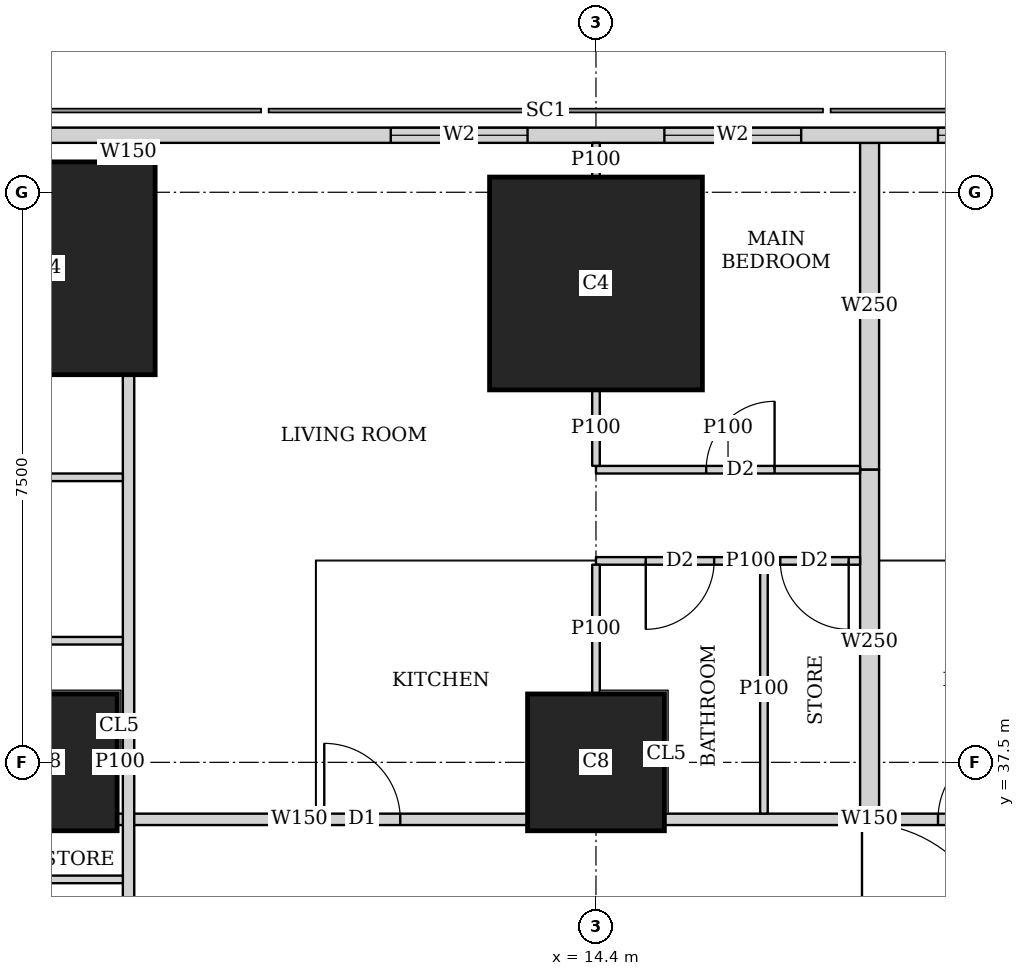
"""IFC4 building model, lengths in metres.
Left out: names, types, materials, properties, quantities, classifications, styles, units other than length and angle.
Written with IfcOpenShell. Run it as: python <this file> out.ifc"""

import sys

from ifc_helpers import new_model, si_unit, direction, frame, frame_2d, origin, origin_2d, place, context, subcontext, project, spatial, rectangle, extrude, element, fill, save


model = new_model("IFC4")
c1 = context("Model", 3, precision=1e-05, world=origin(), true_north=direction((0.0, 1.0)))
c2 = subcontext(c1, "Body", "Model", "MODEL_VIEW")
j1 = project(units=[si_unit("LENGTHUNIT", "METRE"), si_unit("PLANEANGLEUNIT", "RADIAN")], contexts=[c1])
p1 = place(None, origin())
s1 = spatial("IfcSite", under=j1, at=p1, CompositionType="ELEMENT")
p2 = place(p1, origin())
s2 = spatial("IfcBuilding", under=s1, at=p2, CompositionType="ELEMENT")
p3 = place(p2, frame((0.0, 0.0, 53.75)))
s3 = spatial("IfcBuildingStorey", under=s2, at=p3, CompositionType="ELEMENT", Elevation=53.75)
for number, where, z_axis, x_axis in (
    (1, (7.2, 37.5, 0.0), (0.0, 0.0, 1.0), (1.0, 0.0, 0.0)),
    (2, (14.4, 37.5, 0.0), (0.0, 0.0, 1.0), (1.0, 0.0, 0.0)),
):
    element("IfcColumn", number, at=place(p3, frame(where, z_axis=z_axis, x_axis=x_axis)), inside=s3, PredefinedType="COLUMN", context=c2, shape_type="SweptSolid", body=[
        extrude(rectangle(XDim=1.8, YDim=1.8, at=origin_2d()), origin(), (0.0, 0.0, 1.0), 3.75),
    ])
for number, where, z_axis, x_axis in (
    (3, (7.2, 44.0, 0.0), (0.0, 0.0, 1.0), (1.0, 0.0, 0.0)),
    (4, (14.4, 43.8, 0.0), (0.0, 0.0, 1.0), (1.0, 0.0, 0.0)),
):
    element("IfcColumn", number, at=place(p3, frame(where, z_axis=z_axis, x_axis=x_axis)), inside=s3, PredefinedType="COLUMN", context=c2, shape_type="SweptSolid", body=[
        extrude(rectangle(XDim=2.8, YDim=2.8, at=origin_2d()), origin(), (0.0, 0.0, 1.0), 3.75),
    ])
p4 = place(p3, frame((40.106, 45.75, 0.0), z_axis=(0.0, 0.0, 1.0), x_axis=(-1.0, 0.0, 0.0)))
e5 = element("IfcWall", 5, at=p4, inside=s3, PredefinedType="SOLIDWALL", context=c2, shape_type="SweptSolid", body=[
    extrude(rectangle(XDim=37.943, YDim=0.2, at=frame_2d((18.971, 0.0))), origin(), (0.0, 0.0, 1.0), 3.5),
])
p5 = place(p4, frame((8.606, 0.0, 0.9)))
e6 = element("IfcOpeningElement", 6, at=p5, cuts=e5, PredefinedType="OPENING", context=c2, shape_type="SweptSolid", body=[
    extrude(rectangle(XDim=1.8, YDim=1.5, at=frame_2d((0.9, 0.75))), frame((0.0, 0.11, 0.0), z_axis=(0.0, -1.0, 0.0), x_axis=(1.0, 0.0, 0.0)), (0.0, 0.0, 1.0), 0.22),
])
p6 = place(p4, frame((12.206, 0.0, 0.9)))
e7 = element("IfcOpeningElement", 7, at=p6, cuts=e5, PredefinedType="OPENING", context=c2, shape_type="SweptSolid", body=[
    extrude(rectangle(XDim=1.8, YDim=1.5, at=frame_2d((0.9, 0.75))), frame((0.0, 0.11, 0.0), z_axis=(0.0, -1.0, 0.0), x_axis=(1.0, 0.0, 0.0)), (0.0, 0.0, 1.0), 0.22),
])
p7 = place(p4, frame((15.806, 0.0, 0.9)))
e8 = element("IfcOpeningElement", 8, at=p7, cuts=e5, PredefinedType="OPENING", context=c2, shape_type="SweptSolid", body=[
    extrude(rectangle(XDim=1.8, YDim=1.5, at=frame_2d((0.9, 0.75))), frame((0.0, 0.11, 0.0), z_axis=(0.0, -1.0, 0.0), x_axis=(1.0, 0.0, 0.0)), (0.0, 0.0, 1.0), 0.22),
])
p8 = place(p4, frame((19.406, 0.0, 0.9)))
e9 = element("IfcOpeningElement", 9, at=p8, cuts=e5, PredefinedType="OPENING", context=c2, shape_type="SweptSolid", body=[
    extrude(rectangle(XDim=1.8, YDim=1.5, at=frame_2d((0.9, 0.75))), frame((0.0, 0.11, 0.0), z_axis=(0.0, -1.0, 0.0), x_axis=(1.0, 0.0, 0.0)), (0.0, 0.0, 1.0), 0.22),
])
p9 = place(p4, frame((23.006, 0.0, 0.9)))
e10 = element("IfcOpeningElement", 10, at=p9, cuts=e5, PredefinedType="OPENING", context=c2, shape_type="SweptSolid", body=[
    extrude(rectangle(XDim=1.8, YDim=1.5, at=frame_2d((0.9, 0.75))), frame((0.0, 0.11, 0.0), z_axis=(0.0, -1.0, 0.0), x_axis=(1.0, 0.0, 0.0)), (0.0, 0.0, 1.0), 0.22),
])
p10 = place(p4, frame((26.606, 0.0, 0.9)))
e11 = element("IfcOpeningElement", 11, at=p10, cuts=e5, PredefinedType="OPENING", context=c2, shape_type="SweptSolid", body=[
    extrude(rectangle(XDim=1.8, YDim=1.5, at=frame_2d((0.9, 0.75))), frame((0.0, 0.11, 0.0), z_axis=(0.0, -1.0, 0.0), x_axis=(1.0, 0.0, 0.0)), (0.0, 0.0, 1.0), 0.22),
])
p11 = place(p3, frame((8.25, 2.426, 0.0), z_axis=(0.0, 0.0, 1.0), x_axis=(0.0, 1.0, 0.0)))
e12 = element("IfcWall", 12, at=p11, inside=s3, PredefinedType="SOLIDWALL", context=c2, shape_type="SweptSolid", body=[
    extrude(rectangle(XDim=40.173, YDim=0.15, at=frame_2d((20.086, 0.0))), origin(), (0.0, 0.0, 1.0), 3.5),
])
p12 = place(p11, frame((6.661, 0.0, 0.0)))
e13 = element("IfcOpeningElement", 13, at=p12, cuts=e12, PredefinedType="OPENING", context=c2, shape_type="SweptSolid", body=[
    extrude(rectangle(XDim=1.0, YDim=2.1, at=frame_2d((0.5, 1.05))), frame((0.0, 0.085, 0.0), z_axis=(0.0, -1.0, 0.0), x_axis=(1.0, 0.0, 0.0)), (0.0, 0.0, 1.0), 0.17),
])
p13 = place(p11, frame((9.986, 0.0, 0.0)))
e14 = element("IfcOpeningElement", 14, at=p13, cuts=e12, PredefinedType="OPENING", context=c2, shape_type="SweptSolid", body=[
    extrude(rectangle(XDim=1.0, YDim=2.1, at=frame_2d((0.5, 1.05))), frame((0.0, 0.085, 0.0), z_axis=(0.0, -1.0, 0.0), x_axis=(1.0, 0.0, 0.0)), (0.0, 0.0, 1.0), 0.17),
])
p14 = place(p11, frame((21.662, 0.0, 0.0)))
e15 = element("IfcOpeningElement", 15, at=p14, cuts=e12, PredefinedType="OPENING", context=c2, shape_type="SweptSolid", body=[
    extrude(rectangle(XDim=1.0, YDim=2.1, at=frame_2d((0.5, 1.05))), frame((0.0, 0.085, 0.0), z_axis=(0.0, -1.0, 0.0), x_axis=(1.0, 0.0, 0.0)), (0.0, 0.0, 1.0), 0.17),
])
p15 = place(p11, frame((29.161, 0.0, 0.0)))
e16 = element("IfcOpeningElement", 16, at=p15, cuts=e12, PredefinedType="OPENING", context=c2, shape_type="SweptSolid", body=[
    extrude(rectangle(XDim=1.0, YDim=2.1, at=frame_2d((0.5, 1.05))), frame((0.0, 0.085, 0.0), z_axis=(0.0, -1.0, 0.0), x_axis=(1.0, 0.0, 0.0)), (0.0, 0.0, 1.0), 0.17),
])
p16 = place(p3, frame((8.25, 45.401, 0.0), z_axis=(0.0, 0.0, 1.0), x_axis=(0.0, 1.0, 0.0)))
e17 = element("IfcWall", 17, at=p16, inside=s3, PredefinedType="SOLIDWALL", context=c2, shape_type="SweptSolid", body=[
    extrude(rectangle(XDim=0.249, YDim=0.15, at=frame_2d((0.125, 0.0))), origin(), (0.0, 0.0, 1.0), 3.5),
])
p17 = place(p3, frame((8.1, 36.75, 0.0), z_axis=(0.0, 0.0, 1.0), x_axis=(1.0, 0.0, 0.0)))
e18 = element("IfcWall", 18, at=p17, inside=s3, PredefinedType="SOLIDWALL", context=c2, shape_type="SweptSolid", body=[
    extrude(rectangle(XDim=5.399, YDim=0.15, at=frame_2d((2.699, 0.0))), origin(), (0.0, 0.0, 1.0), 3.5),
])
p18 = place(p17, frame((2.725, 0.0, 0.0)))
e19 = element("IfcOpeningElement", 19, at=p18, cuts=e18, PredefinedType="OPENING", context=c2, shape_type="SweptSolid", body=[
    extrude(rectangle(XDim=1.0, YDim=2.1, at=frame_2d((0.5, 1.05))), frame((0.0, 0.085, 0.0), z_axis=(0.0, -1.0, 0.0), x_axis=(1.0, 0.0, 0.0)), (0.0, 0.0, 1.0), 0.17),
])
p19 = place(p3, frame((15.301, 36.75, 0.0), z_axis=(0.0, 0.0, 1.0), x_axis=(1.0, 0.0, 0.0)))
e20 = element("IfcWall", 20, at=p19, inside=s3, PredefinedType="SOLIDWALL", context=c2, shape_type="SweptSolid", body=[
    extrude(rectangle(XDim=5.398, YDim=0.15, at=frame_2d((2.699, 0.0))), origin(), (0.0, 0.0, 1.0), 3.5),
])
p20 = place(p19, frame((3.599, 0.0, 0.0)))
e21 = element("IfcOpeningElement", 21, at=p20, cuts=e20, PredefinedType="OPENING", context=c2, shape_type="SweptSolid", body=[
    extrude(rectangle(XDim=1.0, YDim=2.1, at=frame_2d((0.5, 1.05))), frame((0.0, 0.085, 0.0), z_axis=(0.0, -1.0, 0.0), x_axis=(1.0, 0.0, 0.0)), (0.0, 0.0, 1.0), 0.17),
])
p21 = place(p3, frame((8.101, 37.5, 0.0), z_axis=(0.0, 0.0, 1.0), x_axis=(1.0, 0.0, 0.0)))
e22 = element("IfcWall", 22, at=p21, inside=s3, PredefinedType="PARTITIONING", context=c2, shape_type="SweptSolid", body=[
    extrude(rectangle(XDim=0.074, YDim=0.1, at=frame_2d((0.037, 0.0))), origin(), (0.0, 0.0, 1.0), 3.5),
])
for number, where, z_axis, x_axis in (
    (23, (4.9, 41.25, 0.0), (0.0, 0.0, 1.0), (1.0, 0.0, 0.0)),
    (24, (4.9, 35.96, 0.0), (0.0, 0.0, 1.0), (1.0, 0.0, 0.0)),
    (25, (4.9, 39.1, 0.0), (0.0, 0.0, 1.0), (1.0, 0.0, 0.0)),
):
    element("IfcWall", number, at=place(p3, frame(where, z_axis=z_axis, x_axis=x_axis)), inside=s3, PredefinedType="PARTITIONING", context=c2, shape_type="SweptSolid", body=[
        extrude(rectangle(XDim=3.275, YDim=0.1, at=frame_2d((1.638, 0.0))), origin(), (0.0, 0.0, 1.0), 3.5),
    ])
p22 = place(p3, frame((14.4, 41.35, 0.0), z_axis=(0.0, 0.0, 1.0), x_axis=(1.0, 0.0, 0.0)))
e26 = element("IfcWall", 26, at=p22, inside=s3, PredefinedType="PARTITIONING", context=c2, shape_type="SweptSolid", body=[
    extrude(rectangle(XDim=3.475, YDim=0.1, at=frame_2d((1.738, 0.0))), origin(), (0.0, 0.0, 1.0), 3.5),
])
p23 = place(p22, frame((1.45, 0.0, 0.0)))
e27 = element("IfcOpeningElement", 27, at=p23, cuts=e26, PredefinedType="OPENING", context=c2, shape_type="SweptSolid", body=[
    extrude(rectangle(XDim=0.9, YDim=2.1, at=frame_2d((0.45, 1.05))), frame((0.0, 0.06, 0.0), z_axis=(0.0, -1.0, 0.0), x_axis=(1.0, 0.0, 0.0)), (0.0, 0.0, 1.0), 0.12),
])
p24 = place(p3, frame((14.4, 40.15, 0.0), z_axis=(0.0, 0.0, 1.0), x_axis=(1.0, 0.0, 0.0)))
e28 = element("IfcWall", 28, at=p24, inside=s3, PredefinedType="PARTITIONING", context=c2, shape_type="SweptSolid", body=[
    extrude(rectangle(XDim=3.475, YDim=0.1, at=frame_2d((1.738, 0.0))), origin(), (0.0, 0.0, 1.0), 3.5),
])
p25 = place(p24, frame((0.655, 0.0, 0.0)))
e29 = element("IfcOpeningElement", 29, at=p25, cuts=e28, PredefinedType="OPENING", context=c2, shape_type="SweptSolid", body=[
    extrude(rectangle(XDim=0.9, YDim=2.1, at=frame_2d((0.45, 1.05))), frame((0.0, 0.06, 0.0), z_axis=(0.0, -1.0, 0.0), x_axis=(1.0, 0.0, 0.0)), (0.0, 0.0, 1.0), 0.12),
])
p26 = place(p24, frame((2.425, 0.0, 0.0)))
e30 = element("IfcOpeningElement", 30, at=p26, cuts=e28, PredefinedType="OPENING", context=c2, shape_type="SweptSolid", body=[
    extrude(rectangle(XDim=0.9, YDim=2.1, at=frame_2d((0.45, 1.05))), frame((0.0, 0.06, 0.0), z_axis=(0.0, -1.0, 0.0), x_axis=(1.0, 0.0, 0.0)), (0.0, 0.0, 1.0), 0.12),
])
p27 = place(p3, frame((14.4, 41.4, 0.0), z_axis=(0.0, 0.0, 1.0), x_axis=(0.0, 1.0, 0.0)))
e31 = element("IfcWall", 31, at=p27, inside=s3, PredefinedType="PARTITIONING", context=c2, shape_type="SweptSolid", body=[
    extrude(rectangle(XDim=0.999, YDim=0.1, at=frame_2d((0.5, 0.0))), origin(), (0.0, 0.0, 1.0), 3.5),
])
p28 = place(p3, frame((14.4, 45.201, 0.0), z_axis=(0.0, 0.0, 1.0), x_axis=(0.0, 1.0, 0.0)))
e32 = element("IfcWall", 32, at=p28, inside=s3, PredefinedType="PARTITIONING", context=c2, shape_type="SweptSolid", body=[
    extrude(rectangle(XDim=0.449, YDim=0.1, at=frame_2d((0.225, 0.0))), origin(), (0.0, 0.0, 1.0), 3.5),
])
p29 = place(p3, frame((14.4, 38.401, 0.0), z_axis=(0.0, 0.0, 1.0), x_axis=(0.0, 1.0, 0.0)))
e33 = element("IfcWall", 33, at=p29, inside=s3, PredefinedType="PARTITIONING", context=c2, shape_type="SweptSolid", body=[
    extrude(rectangle(XDim=1.699, YDim=0.1, at=frame_2d((0.85, 0.0))), origin(), (0.0, 0.0, 1.0), 3.5),
])
p30 = place(p3, frame((16.61, 36.825, 0.0), z_axis=(0.0, 0.0, 1.0), x_axis=(0.0, 1.0, 0.0)))
e34 = element("IfcWall", 34, at=p30, inside=s3, PredefinedType="PARTITIONING", context=c2, shape_type="SweptSolid", body=[
    extrude(rectangle(XDim=3.275, YDim=0.1, at=frame_2d((1.638, 0.0))), origin(), (0.0, 0.0, 1.0), 3.5),
])
p31 = place(p3, frame((18.0, 41.35, 0.0), z_axis=(0.0, 0.0, 1.0), x_axis=(0.0, 1.0, 0.0)))
e35 = element("IfcWall", 35, at=p31, inside=s3, PredefinedType="SOLIDWALL", context=c2, shape_type="SweptSolid", body=[
    extrude(rectangle(XDim=4.3, YDim=0.25, at=frame_2d((2.15, 0.0))), origin(), (0.0, 0.0, 1.0), 2.05),
])
p32 = place(p3, frame((18.0, 36.825, 0.0), z_axis=(0.0, 0.0, 1.0), x_axis=(0.0, 1.0, 0.0)))
e36 = element("IfcWall", 36, at=p32, inside=s3, PredefinedType="SOLIDWALL", context=c2, shape_type="SweptSolid", body=[
    extrude(rectangle(XDim=4.525, YDim=0.25, at=frame_2d((2.263, 0.0))), origin(), (0.0, 0.0, 1.0), 3.5),
])
p33 = place(p8, origin())
e37 = element("IfcWindow", 37, at=p33, inside=s3, PartitioningType="SINGLE_PANEL", PredefinedType="WINDOW", context=c2, shape_type="SweptSolid", body=[
    extrude(rectangle(XDim=1.8, YDim=1.5, at=frame_2d((0.9, 0.75))), frame((0.0, 0.03, 0.0), z_axis=(0.0, -1.0, 0.0), x_axis=(1.0, 0.0, 0.0)), (0.0, 0.0, 1.0), 0.06),
])
fill(e9, e37)
p34 = place(p9, origin())
e38 = element("IfcWindow", 38, at=p34, inside=s3, PartitioningType="SINGLE_PANEL", PredefinedType="WINDOW", context=c2, shape_type="SweptSolid", body=[
    extrude(rectangle(XDim=1.8, YDim=1.5, at=frame_2d((0.9, 0.75))), frame((0.0, 0.03, 0.0), z_axis=(0.0, -1.0, 0.0), x_axis=(1.0, 0.0, 0.0)), (0.0, 0.0, 1.0), 0.06),
])
fill(e10, e38)
p35 = place(p10, origin())
e39 = element("IfcWindow", 39, at=p35, inside=s3, PartitioningType="SINGLE_PANEL", PredefinedType="WINDOW", context=c2, shape_type="SweptSolid", body=[
    extrude(rectangle(XDim=1.8, YDim=1.5, at=frame_2d((0.9, 0.75))), frame((0.0, 0.03, 0.0), z_axis=(0.0, -1.0, 0.0), x_axis=(1.0, 0.0, 0.0)), (0.0, 0.0, 1.0), 0.06),
])
fill(e11, e39)
p36 = place(p23, origin())
e40 = element("IfcDoor", 40, at=p36, inside=s3, OperationType="SINGLE_SWING_RIGHT", PredefinedType="DOOR", context=c2, shape_type="SweptSolid", body=[
    extrude(rectangle(XDim=0.9, YDim=2.1, at=frame_2d((0.45, 1.05))), frame((0.0, 0.025, 0.0), z_axis=(0.0, -1.0, 0.0), x_axis=(1.0, 0.0, 0.0)), (0.0, 0.0, 1.0), 0.05),
])
fill(e27, e40)
p37 = place(p25, origin())
e41 = element("IfcDoor", 41, at=p37, inside=s3, OperationType="SINGLE_SWING_RIGHT", PredefinedType="DOOR", context=c2, shape_type="SweptSolid", body=[
    extrude(rectangle(XDim=0.9, YDim=2.1, at=frame_2d((0.45, 1.05))), frame((0.0, 0.025, 0.0), z_axis=(0.0, -1.0, 0.0), x_axis=(1.0, 0.0, 0.0)), (0.0, 0.0, 1.0), 0.05),
])
fill(e29, e41)
p38 = place(p26, origin())
e42 = element("IfcDoor", 42, at=p38, inside=s3, OperationType="SINGLE_SWING_LEFT", PredefinedType="DOOR", context=c2, shape_type="SweptSolid", body=[
    extrude(rectangle(XDim=0.9, YDim=2.1, at=frame_2d((0.45, 1.05))), frame((0.0, 0.025, 0.0), z_axis=(0.0, -1.0, 0.0), x_axis=(1.0, 0.0, 0.0)), (0.0, 0.0, 1.0), 0.05),
])
fill(e30, e42)
p39 = place(p18, origin())
e43 = element("IfcDoor", 43, at=p39, inside=s3, OperationType="SINGLE_SWING_LEFT", PredefinedType="DOOR", context=c2, shape_type="SweptSolid", body=[
    extrude(rectangle(XDim=1.0, YDim=2.1, at=frame_2d((0.5, 1.05))), frame((0.0, 0.025, 0.0), z_axis=(0.0, -1.0, 0.0), x_axis=(1.0, 0.0, 0.0)), (0.0, 0.0, 1.0), 0.05),
])
fill(e19, e43)
p40 = place(p20, origin())
e44 = element("IfcDoor", 44, at=p40, inside=s3, OperationType="SINGLE_SWING_RIGHT", PredefinedType="DOOR", context=c2, shape_type="SweptSolid", body=[
    extrude(rectangle(XDim=1.0, YDim=2.1, at=frame_2d((0.5, 1.05))), frame((0.0, 0.025, 0.0), z_axis=(0.0, -1.0, 0.0), x_axis=(1.0, 0.0, 0.0)), (0.0, 0.0, 1.0), 0.05),
])
fill(e21, e44)
save(model, sys.argv[1])
